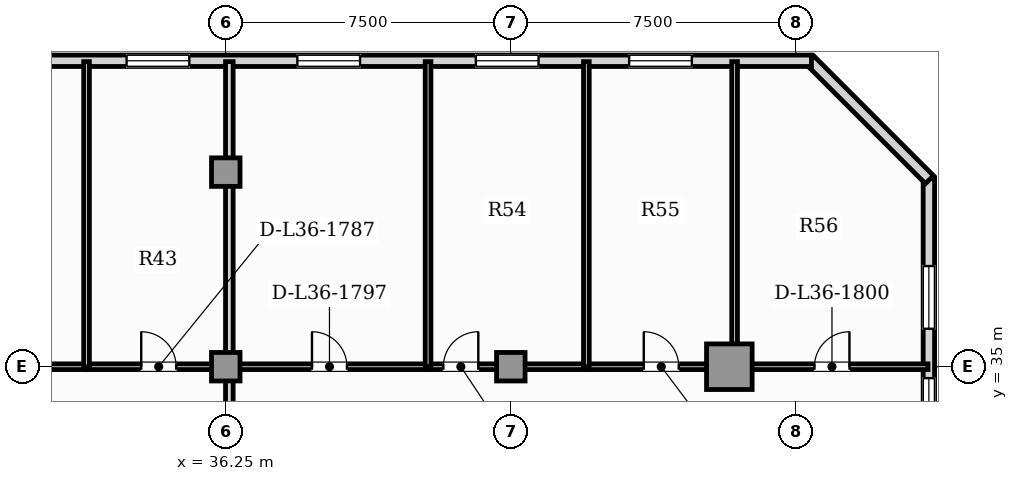
"""IFC4 building model, lengths in metres.
Left out: names, types, materials, properties, quantities, classifications, styles, units other than length and angle.
Written with IfcOpenShell. Run it as: python <this file> out.ifc"""

import sys

from ifc_helpers import new_model, si_unit, direction, frame, frame_2d, origin, origin_2d, place, context, subcontext, project, spatial, rectangle, hollow_rectangle, extrude, element, fill, save


model = new_model("IFC4")
c1 = context("Model", 3, precision=1e-05, world=origin(), true_north=direction((0.0, 1.0)))
c2 = subcontext(c1, "Body", "Model", "MODEL_VIEW")
j1 = project(units=[si_unit("LENGTHUNIT", "METRE"), si_unit("PLANEANGLEUNIT", "RADIAN")], contexts=[c1])
p1 = place(None, origin())
s1 = spatial("IfcSite", under=j1, at=p1, CompositionType="ELEMENT")
p2 = place(p1, origin())
s2 = spatial("IfcBuilding", under=s1, at=p2, CompositionType="ELEMENT")
p3 = place(p2, frame((0.0, 0.0, 149.05)))
s3 = spatial("IfcBuildingStorey", under=s2, at=p3, CompositionType="ELEMENT", Elevation=149.05)
p4 = place(p3, frame((49.5, 35.0, 0.0), z_axis=(0.0, 0.0, 1.0), x_axis=(1.0, 0.0, 0.0)))
e1 = element("IfcColumn", 1, at=p4, inside=s3, PredefinedType="USERDEFINED", context=c2, shape_type="SweptSolid", body=[
    extrude(hollow_rectangle(XDim=1.2, YDim=1.2, WallThickness=0.07, at=origin_2d()), origin(), (0.0, 0.0, 1.0), 3.85),
])
for number, where, z_axis, x_axis in (
    (2, (36.25, 40.12, 0.0), (0.0, 0.0, 1.0), (1.0, 0.0, 0.0)),
    (3, (36.25, 35.0, 0.0), (0.0, 0.0, 1.0), (1.0, 0.0, 0.0)),
    (4, (43.75, 35.0, 0.0), (0.0, 0.0, 1.0), (1.0, 0.0, 0.0)),
):
    element("IfcColumn", number, at=place(p3, frame(where, z_axis=z_axis, x_axis=x_axis)), inside=s3, PredefinedType="COLUMN", context=c2, shape_type="SweptSolid", body=[
        extrude(rectangle(XDim=0.75, YDim=0.75, at=origin_2d()), origin(), (0.0, 0.0, 1.0), 3.85),
    ])
p5 = place(p3, frame((54.75, 3.24, 0.0), z_axis=(0.0, 0.0, 1.0), x_axis=(0.0, 1.0, 0.0)))
e5 = element("IfcWall", 5, at=p5, inside=s3, PredefinedType="SOLIDWALL", context=c2, shape_type="SweptSolid", body=[
    extrude(rectangle(XDim=36.72, YDim=0.3, at=frame_2d((18.36, 0.0))), origin(), (0.0, 0.0, 1.0), 3.63),
])
p6 = place(p5, frame((30.56, 0.0, 0.95)))
e6 = element("IfcOpeningElement", 6, at=p6, cuts=e5, PredefinedType="OPENING", context=c2, shape_type="SweptSolid", body=[
    extrude(rectangle(XDim=0.9, YDim=1.5, at=frame_2d((0.45, 0.75))), frame((0.0, 0.16, 0.0), z_axis=(0.0, -1.0, 0.0), x_axis=(1.0, 0.0, 0.0)), (0.0, 0.0, 1.0), 0.32),
])
p7 = place(p5, frame((10.995, 0.0, 0.95)))
e7 = element("IfcOpeningElement", 7, at=p7, cuts=e5, PredefinedType="OPENING", context=c2, shape_type="SweptSolid", body=[
    extrude(rectangle(XDim=0.9, YDim=1.5, at=frame_2d((0.45, 0.75))), frame((0.0, 0.16, 0.0), z_axis=(0.0, -1.0, 0.0), x_axis=(1.0, 0.0, 0.0)), (0.0, 0.0, 1.0), 0.32),
])
p8 = place(p5, frame((13.304, 0.0, 0.88)))
e8 = element("IfcOpeningElement", 8, at=p8, cuts=e5, PredefinedType="OPENING", context=c2, shape_type="SweptSolid", body=[
    extrude(rectangle(XDim=1.65, YDim=2.0, at=frame_2d((0.825, 1.0))), frame((0.0, 0.16, 0.0), z_axis=(0.0, -1.0, 0.0), x_axis=(1.0, 0.0, 0.0)), (0.0, 0.0, 1.0), 0.32),
])
p9 = place(p5, frame((18.021, 0.0, 0.88)))
e9 = element("IfcOpeningElement", 9, at=p9, cuts=e5, PredefinedType="OPENING", context=c2, shape_type="SweptSolid", body=[
    extrude(rectangle(XDim=1.65, YDim=2.0, at=frame_2d((0.825, 1.0))), frame((0.0, 0.16, 0.0), z_axis=(0.0, -1.0, 0.0), x_axis=(1.0, 0.0, 0.0)), (0.0, 0.0, 1.0), 0.32),
])
p10 = place(p5, frame((25.201, 0.0, 0.88)))
e10 = element("IfcOpeningElement", 10, at=p10, cuts=e5, PredefinedType="OPENING", context=c2, shape_type="SweptSolid", body=[
    extrude(rectangle(XDim=1.65, YDim=2.0, at=frame_2d((0.825, 1.0))), frame((0.0, 0.16, 0.0), z_axis=(0.0, -1.0, 0.0), x_axis=(1.0, 0.0, 0.0)), (0.0, 0.0, 1.0), 0.32),
])
p11 = place(p5, frame((32.759, 0.0, 0.88)))
e11 = element("IfcOpeningElement", 11, at=p11, cuts=e5, PredefinedType="OPENING", context=c2, shape_type="SweptSolid", body=[
    extrude(rectangle(XDim=1.65, YDim=2.0, at=frame_2d((0.825, 1.0))), frame((0.0, 0.16, 0.0), z_axis=(0.0, -1.0, 0.0), x_axis=(1.0, 0.0, 0.0)), (0.0, 0.0, 1.0), 0.32),
])
p12 = place(p3, frame((54.766, 39.922, 0.0), z_axis=(0.0, 0.0, 1.0), x_axis=(-0.707079321262, 0.707134240044, 0.0)))
e12 = element("IfcWall", 12, at=p12, inside=s3, PredefinedType="SOLIDWALL", context=c2, shape_type="SweptSolid", body=[
    extrude(rectangle(XDim=4.446, YDim=0.3, at=frame_2d((2.223, 0.0))), origin(), (0.0, 0.0, 1.0), 3.63),
])
p13 = place(p3, frame((51.66, 43.05, 0.0), z_axis=(0.0, 0.0, 1.0), x_axis=(-1.0, 0.0, 0.0)))
e13 = element("IfcWall", 13, at=p13, inside=s3, PredefinedType="SOLIDWALL", context=c2, shape_type="SweptSolid", body=[
    extrude(rectangle(XDim=45.82, YDim=0.3, at=frame_2d((22.91, 0.0))), origin(), (0.0, 0.0, 1.0), 3.63),
])
p14 = place(p13, frame((44.14, 0.0, 0.95)))
e14 = element("IfcOpeningElement", 14, at=p14, cuts=e13, PredefinedType="OPENING", context=c2, shape_type="SweptSolid", body=[
    extrude(rectangle(XDim=0.9, YDim=1.5, at=frame_2d((0.45, 0.75))), frame((0.0, 0.16, 0.0), z_axis=(0.0, -1.0, 0.0), x_axis=(1.0, 0.0, 0.0)), (0.0, 0.0, 1.0), 0.32),
])
p15 = place(p13, frame((40.929, 0.0, 0.88)))
e15 = element("IfcOpeningElement", 15, at=p15, cuts=e13, PredefinedType="OPENING", context=c2, shape_type="SweptSolid", body=[
    extrude(rectangle(XDim=1.65, YDim=2.0, at=frame_2d((0.825, 1.0))), frame((0.0, 0.16, 0.0), z_axis=(0.0, -1.0, 0.0), x_axis=(1.0, 0.0, 0.0)), (0.0, 0.0, 1.0), 0.32),
])
p16 = place(p13, frame((37.354, 0.0, 0.88)))
e16 = element("IfcOpeningElement", 16, at=p16, cuts=e13, PredefinedType="OPENING", context=c2, shape_type="SweptSolid", body=[
    extrude(rectangle(XDim=1.65, YDim=2.0, at=frame_2d((0.825, 1.0))), frame((0.0, 0.16, 0.0), z_axis=(0.0, -1.0, 0.0), x_axis=(1.0, 0.0, 0.0)), (0.0, 0.0, 1.0), 0.32),
])
p17 = place(p13, frame((31.515, 0.0, 0.88)))
e17 = element("IfcOpeningElement", 17, at=p17, cuts=e13, PredefinedType="OPENING", context=c2, shape_type="SweptSolid", body=[
    extrude(rectangle(XDim=1.65, YDim=2.0, at=frame_2d((0.825, 1.0))), frame((0.0, 0.16, 0.0), z_axis=(0.0, -1.0, 0.0), x_axis=(1.0, 0.0, 0.0)), (0.0, 0.0, 1.0), 0.32),
])
p18 = place(p13, frame((27.781, 0.0, 0.88)))
e18 = element("IfcOpeningElement", 18, at=p18, cuts=e13, PredefinedType="OPENING", context=c2, shape_type="SweptSolid", body=[
    extrude(rectangle(XDim=1.65, YDim=2.0, at=frame_2d((0.825, 1.0))), frame((0.0, 0.16, 0.0), z_axis=(0.0, -1.0, 0.0), x_axis=(1.0, 0.0, 0.0)), (0.0, 0.0, 1.0), 0.32),
])
p19 = place(p13, frame((24.031, 0.0, 0.88)))
e19 = element("IfcOpeningElement", 19, at=p19, cuts=e13, PredefinedType="OPENING", context=c2, shape_type="SweptSolid", body=[
    extrude(rectangle(XDim=1.65, YDim=2.0, at=frame_2d((0.825, 1.0))), frame((0.0, 0.16, 0.0), z_axis=(0.0, -1.0, 0.0), x_axis=(1.0, 0.0, 0.0)), (0.0, 0.0, 1.0), 0.32),
])
p20 = place(p13, frame((20.167, 0.0, 0.88)))
e20 = element("IfcOpeningElement", 20, at=p20, cuts=e13, PredefinedType="OPENING", context=c2, shape_type="SweptSolid", body=[
    extrude(rectangle(XDim=1.65, YDim=2.0, at=frame_2d((0.825, 1.0))), frame((0.0, 0.16, 0.0), z_axis=(0.0, -1.0, 0.0), x_axis=(1.0, 0.0, 0.0)), (0.0, 0.0, 1.0), 0.32),
])
p21 = place(p13, frame((16.37, 0.0, 0.88)))
e21 = element("IfcOpeningElement", 21, at=p21, cuts=e13, PredefinedType="OPENING", context=c2, shape_type="SweptSolid", body=[
    extrude(rectangle(XDim=1.65, YDim=2.0, at=frame_2d((0.825, 1.0))), frame((0.0, 0.16, 0.0), z_axis=(0.0, -1.0, 0.0), x_axis=(1.0, 0.0, 0.0)), (0.0, 0.0, 1.0), 0.32),
])
p22 = place(p13, frame((11.877, 0.0, 0.88)))
e22 = element("IfcOpeningElement", 22, at=p22, cuts=e13, PredefinedType="OPENING", context=c2, shape_type="SweptSolid", body=[
    extrude(rectangle(XDim=1.65, YDim=2.0, at=frame_2d((0.825, 1.0))), frame((0.0, 0.16, 0.0), z_axis=(0.0, -1.0, 0.0), x_axis=(1.0, 0.0, 0.0)), (0.0, 0.0, 1.0), 0.32),
])
p23 = place(p13, frame((7.179, 0.0, 0.88)))
e23 = element("IfcOpeningElement", 23, at=p23, cuts=e13, PredefinedType="OPENING", context=c2, shape_type="SweptSolid", body=[
    extrude(rectangle(XDim=1.65, YDim=2.0, at=frame_2d((0.825, 1.0))), frame((0.0, 0.16, 0.0), z_axis=(0.0, -1.0, 0.0), x_axis=(1.0, 0.0, 0.0)), (0.0, 0.0, 1.0), 0.32),
])
p24 = place(p13, frame((3.146, 0.0, 0.88)))
e24 = element("IfcOpeningElement", 24, at=p24, cuts=e13, PredefinedType="OPENING", context=c2, shape_type="SweptSolid", body=[
    extrude(rectangle(XDim=1.65, YDim=2.0, at=frame_2d((0.825, 1.0))), frame((0.0, 0.16, 0.0), z_axis=(0.0, -1.0, 0.0), x_axis=(1.0, 0.0, 0.0)), (0.0, 0.0, 1.0), 0.32),
])
p25 = place(p3, frame((28.785, 35.0, 0.0), z_axis=(0.0, 0.0, 1.0), x_axis=(1.0, 0.0, 0.0)))
e25 = element("IfcWall", 25, at=p25, inside=s3, PredefinedType="PARTITIONING", context=c2, shape_type="SweptSolid", body=[
    extrude(rectangle(XDim=3.807, YDim=0.15, at=frame_2d((1.903, 0.0))), origin(), (0.0, 0.0, 1.0), 3.013),
])
p26 = place(p25, frame((1.443, 0.0, 0.0)))
e26 = element("IfcOpeningElement", 26, at=p26, cuts=e25, PredefinedType="OPENING", context=c2, shape_type="SweptSolid", body=[
    extrude(rectangle(XDim=0.92, YDim=2.1, at=frame_2d((0.46, 1.05))), frame((0.0, 0.085, 0.0), z_axis=(0.0, -1.0, 0.0), x_axis=(1.0, 0.0, 0.0)), (0.0, 0.0, 1.0), 0.17),
])
p27 = place(p3, frame((32.622, 35.0, 0.0), z_axis=(0.0, 0.0, 1.0), x_axis=(1.0, 0.0, 0.0)))
e27 = element("IfcWall", 27, at=p27, inside=s3, PredefinedType="PARTITIONING", context=c2, shape_type="SweptSolid", body=[
    extrude(rectangle(XDim=3.728, YDim=0.15, at=frame_2d((1.864, 0.0))), origin(), (0.0, 0.0, 1.0), 3.013),
])
p28 = place(p27, frame((1.404, 0.0, 0.0)))
e28 = element("IfcOpeningElement", 28, at=p28, cuts=e27, PredefinedType="OPENING", context=c2, shape_type="SweptSolid", body=[
    extrude(rectangle(XDim=0.92, YDim=2.1, at=frame_2d((0.46, 1.05))), frame((0.0, 0.085, 0.0), z_axis=(0.0, -1.0, 0.0), x_axis=(1.0, 0.0, 0.0)), (0.0, 0.0, 1.0), 0.17),
])
p29 = place(p3, frame((36.344, 33.495, 0.0), z_axis=(0.0, 0.0, 1.0), x_axis=(0.0, 1.0, 0.0)))
e29 = element("IfcWall", 29, at=p29, inside=s3, PredefinedType="PARTITIONING", context=c2, shape_type="SweptSolid", body=[
    extrude(rectangle(XDim=1.51, YDim=0.2, at=frame_2d((0.755, 0.0))), origin(), (0.0, 0.0, 1.0), 3.177),
])
p30 = place(p3, frame((32.586, 34.995, 0.0), z_axis=(0.0, 0.0, 1.0), x_axis=(0.0, 1.0, 0.0)))
e30 = element("IfcWall", 30, at=p30, inside=s3, PredefinedType="PARTITIONING", context=c2, shape_type="SweptSolid", body=[
    extrude(rectangle(XDim=8.032, YDim=0.15, at=frame_2d((4.016, 0.0))), origin(), (0.0, 0.0, 1.0), 3.63),
])
p31 = place(p3, frame((36.344, 35.035, 0.0), z_axis=(0.0, 0.0, 1.0), x_axis=(0.0, 1.0, 0.0)))
e31 = element("IfcWall", 31, at=p31, inside=s3, PredefinedType="PARTITIONING", context=c2, shape_type="SweptSolid", body=[
    extrude(rectangle(XDim=7.993, YDim=0.2, at=frame_2d((3.996, 0.0))), origin(), (0.0, 0.0, 1.0), 3.63),
])
p32 = place(p3, frame((36.379, 35.0, 0.0), z_axis=(0.0, 0.0, 1.0), x_axis=(1.0, 0.0, 0.0)))
e32 = element("IfcWall", 32, at=p32, inside=s3, PredefinedType="PARTITIONING", context=c2, shape_type="SweptSolid", body=[
    extrude(rectangle(XDim=5.198, YDim=0.15, at=frame_2d((2.599, 0.0))), origin(), (0.0, 0.0, 1.0), 3.013),
])
p33 = place(p32, frame((2.139, 0.0, 0.0)))
e33 = element("IfcOpeningElement", 33, at=p33, cuts=e32, PredefinedType="OPENING", context=c2, shape_type="SweptSolid", body=[
    extrude(rectangle(XDim=0.92, YDim=2.1, at=frame_2d((0.46, 1.05))), frame((0.0, 0.085, 0.0), z_axis=(0.0, -1.0, 0.0), x_axis=(1.0, 0.0, 0.0)), (0.0, 0.0, 1.0), 0.17),
])
p34 = place(p3, frame((41.608, 35.0, 0.0), z_axis=(0.0, 0.0, 1.0), x_axis=(1.0, 0.0, 0.0)))
e34 = element("IfcWall", 34, at=p34, inside=s3, PredefinedType="PARTITIONING", context=c2, shape_type="SweptSolid", body=[
    extrude(rectangle(XDim=4.136, YDim=0.15, at=frame_2d((2.068, 0.0))), origin(), (0.0, 0.0, 1.0), 3.013),
])
p35 = place(p34, frame((0.367, 0.0, 0.0)))
e35 = element("IfcOpeningElement", 35, at=p35, cuts=e34, PredefinedType="OPENING", context=c2, shape_type="SweptSolid", body=[
    extrude(rectangle(XDim=0.92, YDim=2.1, at=frame_2d((0.46, 1.05))), frame((0.0, 0.085, 0.0), z_axis=(0.0, -1.0, 0.0), x_axis=(1.0, 0.0, 0.0)), (0.0, 0.0, 1.0), 0.17),
])
p36 = place(p3, frame((45.773, 35.0, 0.0), z_axis=(0.0, 0.0, 1.0), x_axis=(1.0, 0.0, 0.0)))
e36 = element("IfcWall", 36, at=p36, inside=s3, PredefinedType="PARTITIONING", context=c2, shape_type="SweptSolid", body=[
    extrude(rectangle(XDim=3.87, YDim=0.15, at=frame_2d((1.935, 0.0))), origin(), (0.0, 0.0, 1.0), 3.013),
])
p37 = place(p36, frame((1.475, 0.0, 0.0)))
e37 = element("IfcOpeningElement", 37, at=p37, cuts=e36, PredefinedType="OPENING", context=c2, shape_type="SweptSolid", body=[
    extrude(rectangle(XDim=0.92, YDim=2.1, at=frame_2d((0.46, 1.05))), frame((0.0, 0.085, 0.0), z_axis=(0.0, -1.0, 0.0), x_axis=(1.0, 0.0, 0.0)), (0.0, 0.0, 1.0), 0.17),
])
p38 = place(p3, frame((49.674, 35.0, 0.0), z_axis=(0.0, 0.0, 1.0), x_axis=(1.0, 0.0, 0.0)))
e38 = element("IfcWall", 38, at=p38, inside=s3, PredefinedType="PARTITIONING", context=c2, shape_type="SweptSolid", body=[
    extrude(rectangle(XDim=5.054, YDim=0.15, at=frame_2d((2.527, 0.0))), origin(), (0.0, 0.0, 1.0), 3.63),
])
p39 = place(p38, frame((2.067, 0.0, 0.0)))
e39 = element("IfcOpeningElement", 39, at=p39, cuts=e38, PredefinedType="OPENING", context=c2, shape_type="SweptSolid", body=[
    extrude(rectangle(XDim=0.92, YDim=2.1, at=frame_2d((0.46, 1.05))), frame((0.0, 0.085, 0.0), z_axis=(0.0, -1.0, 0.0), x_axis=(1.0, 0.0, 0.0)), (0.0, 0.0, 1.0), 0.17),
])
for number, where, z_axis, x_axis in (
    (40, (41.573, 34.995, 0.0), (0.0, 0.0, 1.0), (0.0, 1.0, 0.0)),
    (41, (45.739, 34.995, 0.0), (0.0, 0.0, 1.0), (0.0, 1.0, 0.0)),
    (42, (49.638, 34.995, 0.0), (0.0, 0.0, 1.0), (0.0, 1.0, 0.0)),
):
    element("IfcWall", number, at=place(p3, frame(where, z_axis=z_axis, x_axis=x_axis)), inside=s3, PredefinedType="PARTITIONING", context=c2, shape_type="SweptSolid", body=[
        extrude(rectangle(XDim=8.032, YDim=0.15, at=frame_2d((4.016, 0.0))), origin(), (0.0, 0.0, 1.0), 3.63),
    ])
p40 = place(p21, origin())
e43 = element("IfcWindow", 43, at=p40, inside=s3, PartitioningType="SINGLE_PANEL", PredefinedType="WINDOW", context=c2, shape_type="SweptSolid", body=[
    extrude(rectangle(XDim=1.65, YDim=2.0, at=frame_2d((0.825, 1.0))), frame((0.0, 0.03, 0.0), z_axis=(0.0, -1.0, 0.0), x_axis=(1.0, 0.0, 0.0)), (0.0, 0.0, 1.0), 0.06),
])
fill(e21, e43)
p41 = place(p6, origin())
e44 = element("IfcWindow", 44, at=p41, inside=s3, PartitioningType="SINGLE_PANEL", PredefinedType="WINDOW", context=c2, shape_type="SweptSolid", body=[
    extrude(rectangle(XDim=0.9, YDim=1.5, at=frame_2d((0.45, 0.75))), frame((0.0, 0.03, 0.0), z_axis=(0.0, -1.0, 0.0), x_axis=(1.0, 0.0, 0.0)), (0.0, 0.0, 1.0), 0.06),
])
fill(e6, e44)
p42 = place(p22, origin())
e45 = element("IfcWindow", 45, at=p42, inside=s3, PartitioningType="SINGLE_PANEL", PredefinedType="WINDOW", context=c2, shape_type="SweptSolid", body=[
    extrude(rectangle(XDim=1.65, YDim=2.0, at=frame_2d((0.825, 1.0))), frame((0.0, 0.03, 0.0), z_axis=(0.0, -1.0, 0.0), x_axis=(1.0, 0.0, 0.0)), (0.0, 0.0, 1.0), 0.06),
])
fill(e22, e45)
p43 = place(p23, origin())
e46 = element("IfcWindow", 46, at=p43, inside=s3, PartitioningType="SINGLE_PANEL", PredefinedType="WINDOW", context=c2, shape_type="SweptSolid", body=[
    extrude(rectangle(XDim=1.65, YDim=2.0, at=frame_2d((0.825, 1.0))), frame((0.0, 0.03, 0.0), z_axis=(0.0, -1.0, 0.0), x_axis=(1.0, 0.0, 0.0)), (0.0, 0.0, 1.0), 0.06),
])
fill(e23, e46)
p44 = place(p24, origin())
e47 = element("IfcWindow", 47, at=p44, inside=s3, PartitioningType="SINGLE_PANEL", PredefinedType="WINDOW", context=c2, shape_type="SweptSolid", body=[
    extrude(rectangle(XDim=1.65, YDim=2.0, at=frame_2d((0.825, 1.0))), frame((0.0, 0.03, 0.0), z_axis=(0.0, -1.0, 0.0), x_axis=(1.0, 0.0, 0.0)), (0.0, 0.0, 1.0), 0.06),
])
fill(e24, e47)
p45 = place(p11, origin())
e48 = element("IfcWindow", 48, at=p45, inside=s3, PartitioningType="SINGLE_PANEL", PredefinedType="WINDOW", context=c2, shape_type="SweptSolid", body=[
    extrude(rectangle(XDim=1.65, YDim=2.0, at=frame_2d((0.825, 1.0))), frame((0.0, 0.03, 0.0), z_axis=(0.0, -1.0, 0.0), x_axis=(1.0, 0.0, 0.0)), (0.0, 0.0, 1.0), 0.06),
])
fill(e11, e48)
p46 = place(p28, origin())
e49 = element("IfcDoor", 49, at=p46, inside=s3, OperationType="SINGLE_SWING_LEFT", PredefinedType="DOOR", context=c2, shape_type="SweptSolid", body=[
    extrude(rectangle(XDim=0.92, YDim=2.1, at=frame_2d((0.46, 1.05))), frame((0.0, 0.025, 0.0), z_axis=(0.0, -1.0, 0.0), x_axis=(1.0, 0.0, 0.0)), (0.0, 0.0, 1.0), 0.05),
])
fill(e28, e49)
p47 = place(p33, origin())
e50 = element("IfcDoor", 50, at=p47, inside=s3, OperationType="SINGLE_SWING_LEFT", PredefinedType="DOOR", context=c2, shape_type="SweptSolid", body=[
    extrude(rectangle(XDim=0.92, YDim=2.1, at=frame_2d((0.46, 1.05))), frame((0.0, 0.025, 0.0), z_axis=(0.0, -1.0, 0.0), x_axis=(1.0, 0.0, 0.0)), (0.0, 0.0, 1.0), 0.05),
])
fill(e33, e50)
p48 = place(p35, origin())
e51 = element("IfcDoor", 51, at=p48, inside=s3, OperationType="SINGLE_SWING_RIGHT", PredefinedType="DOOR", context=c2, shape_type="SweptSolid", body=[
    extrude(rectangle(XDim=0.92, YDim=2.1, at=frame_2d((0.46, 1.05))), frame((0.0, 0.025, 0.0), z_axis=(0.0, -1.0, 0.0), x_axis=(1.0, 0.0, 0.0)), (0.0, 0.0, 1.0), 0.05),
])
fill(e35, e51)
p49 = place(p37, origin())
e52 = element("IfcDoor", 52, at=p49, inside=s3, OperationType="SINGLE_SWING_LEFT", PredefinedType="DOOR", context=c2, shape_type="SweptSolid", body=[
    extrude(rectangle(XDim=0.92, YDim=2.1, at=frame_2d((0.46, 1.05))), frame((0.0, 0.025, 0.0), z_axis=(0.0, -1.0, 0.0), x_axis=(1.0, 0.0, 0.0)), (0.0, 0.0, 1.0), 0.05),
])
fill(e37, e52)
p50 = place(p39, origin())
e53 = element("IfcDoor", 53, at=p50, inside=s3, OperationType="SINGLE_SWING_RIGHT", PredefinedType="DOOR", context=c2, shape_type="SweptSolid", body=[
    extrude(rectangle(XDim=0.92, YDim=2.1, at=frame_2d((0.46, 1.05))), frame((0.0, 0.025, 0.0), z_axis=(0.0, -1.0, 0.0), x_axis=(1.0, 0.0, 0.0)), (0.0, 0.0, 1.0), 0.05),
])
fill(e39, e53)
save(model, sys.argv[1])
